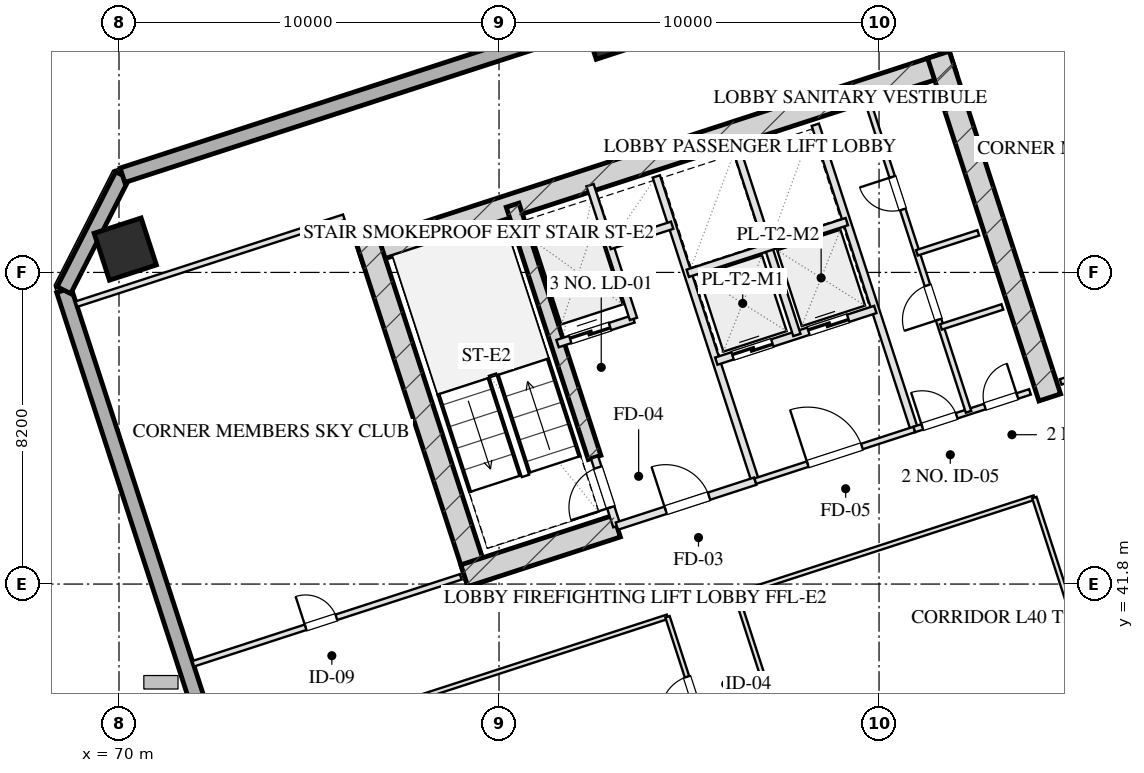
"""IFC4 building model, lengths in metres.
Left out: names, types, materials, properties, quantities, classifications, styles, units other than length and angle.
Written with IfcOpenShell. Run it as: python <this file> out.ifc"""

import sys

from ifc_helpers import new_model, si_unit, direction, frame, frame_2d, origin, origin_2d, place, context, subcontext, project, spatial, rectangle, hollow_rectangle, extrude, element, fill, save


model = new_model("IFC4")
c1 = context("Model", 3, precision=1e-05, world=origin(), true_north=direction((0.0, 1.0)))
c2 = subcontext(c1, "Body", "Model", "MODEL_VIEW")
j1 = project(units=[si_unit("LENGTHUNIT", "METRE"), si_unit("PLANEANGLEUNIT", "RADIAN")], contexts=[c1])
p1 = place(None, origin())
s1 = spatial("IfcSite", under=j1, at=p1, CompositionType="ELEMENT")
p2 = place(p1, origin())
s2 = spatial("IfcBuilding", under=s1, at=p2, CompositionType="ELEMENT")
p3 = place(p2, frame((0.0, 0.0, 152.95)))
s3 = spatial("IfcBuildingStorey", under=s2, at=p3, CompositionType="ELEMENT", Elevation=152.95)
p4 = place(p3, frame((76.344, 50.466, 0.0), z_axis=(0.0, 0.0, 1.0), x_axis=(0.951055727519, 0.309019421968, 0.0)))
e1 = element("IfcWall", 1, at=p4, inside=s3, PredefinedType="SHEAR", context=c2, shape_type="SweptSolid", body=[
    extrude(rectangle(XDim=16.4, YDim=0.6, at=frame_2d((8.2, 0.0))), origin(), (0.0, 0.0, 1.0), 3.45),
])
for number, where, z_axis, x_axis in (
    (2, (79.466, 41.828, 0.0), (0.0, 0.0, 1.0), (-0.309, 0.951, 0.0)),
    (3, (94.492, 46.71, 0.0), (0.0, 0.0, 1.0), (-0.309, 0.951, 0.0)),
):
    element("IfcWall", number, at=place(p3, frame(where, z_axis=z_axis, x_axis=x_axis)), inside=s3, PredefinedType="SHEAR", context=c2, shape_type="SweptSolid", body=[
        extrude(rectangle(XDim=9.48, YDim=0.6, at=frame_2d((4.74, 0.0))), origin(), (0.0, 0.0, 1.0), 3.45),
    ])
p5 = place(p3, frame((82.514, 45.131, 0.0), z_axis=(0.0, 0.0, 1.0), x_axis=(-0.308988790936, 0.951065679686, 0.0)))
e4 = element("IfcWall", 4, at=p5, inside=s3, PredefinedType="SHEAR", context=c2, shape_type="SweptSolid", body=[
    extrude(rectangle(XDim=6.98, YDim=0.35, at=frame_2d((3.49, 0.0))), origin(), (0.0, 0.0, 1.0), 3.45),
])
p6 = place(p3, frame((79.087, 42.021, 0.0), z_axis=(0.0, 0.0, 1.0), x_axis=(0.951062550203, 0.3089984233, 0.0)))
e5 = element("IfcWall", 5, at=p6, inside=s3, PredefinedType="SHEAR", context=c2, shape_type="SweptSolid", body=[
    extrude(rectangle(XDim=4.22, YDim=0.6, at=frame_2d((2.11, 0.0))), origin(), (0.0, 0.0, 1.0), 3.45),
])
p7 = place(p3, frame((70.165, 50.614, 0.0), z_axis=(0.0, 0.0, 1.0), x_axis=(0.951056516295, 0.309016994375, 0.0)))
e6 = element("IfcColumn", 6, at=p7, inside=s3, PredefinedType="COLUMN", context=c2, shape_type="SweptSolid", body=[
    extrude(hollow_rectangle(XDim=1.3, YDim=1.3, WallThickness=0.045, at=origin_2d()), origin(), (0.0, 0.0, 1.0), 3.451),
])
p8 = place(p3, frame((82.815, 56.112, 0.0), z_axis=(0.0, 0.0, 1.0), x_axis=(0.951056516295, 0.309016994375, 0.0)))
e7 = element("IfcColumn", 7, at=p8, inside=s3, PredefinedType="COLUMN", context=c2, shape_type="SweptSolid", body=[
    extrude(hollow_rectangle(XDim=0.8, YDim=0.8, WallThickness=0.028, at=origin_2d()), origin(), (0.0, 0.0, 1.0), 3.451),
])
p9 = place(p3, frame((81.776, 8.827, 0.0), z_axis=(0.0, 0.0, 1.0), x_axis=(-0.309014228706, 0.951057414911, 0.0)))
e8 = element("IfcWall", 8, at=p9, inside=s3, PredefinedType="SOLIDWALL", context=c2, shape_type="SweptSolid", body=[
    extrude(rectangle(XDim=42.8, YDim=0.4, at=frame_2d((21.4, 0.0))), origin(), (0.0, 0.0, 1.0), 2.61),
])
p10 = place(p9, frame((26.675, 0.0, 0.75)))
e9 = element("IfcOpeningElement", 9, at=p10, cuts=e8, PredefinedType="OPENING", context=c2, shape_type="SweptSolid", body=[
    extrude(rectangle(XDim=2.25, YDim=1.46, at=frame_2d((1.125, 0.73))), frame((0.0, 0.21, 0.0), z_axis=(0.0, -1.0, 0.0), x_axis=(1.0, 0.0, 0.0)), (0.0, 0.0, 1.0), 0.42),
])
p11 = place(p9, frame((15.05, 0.0, 0.0)))
e10 = element("IfcOpeningElement", 10, at=p11, cuts=e8, PredefinedType="OPENING", context=c2, shape_type="SweptSolid", body=[
    extrude(rectangle(XDim=1.1, YDim=2.15, at=frame_2d((0.55, 1.075))), frame((0.0, 0.21, 0.0), z_axis=(0.0, -1.0, 0.0), x_axis=(1.0, 0.0, 0.0)), (0.0, 0.0, 1.0), 0.42),
])
p12 = place(p3, frame((68.551, 49.532, 0.0), z_axis=(0.0, 0.0, 1.0), x_axis=(0.454019523198, 0.890991735402, 0.0)))
e11 = element("IfcWall", 11, at=p12, inside=s3, PredefinedType="SOLIDWALL", context=c2, shape_type="SweptSolid", body=[
    extrude(rectangle(XDim=3.394, YDim=0.4, at=frame_2d((1.697, 0.0))), origin(), (0.0, 0.0, 1.0), 2.61),
])
p13 = place(p3, frame((70.092, 52.556, 0.0), z_axis=(0.0, 0.0, 1.0), x_axis=(0.951057580055, 0.30901372044, 0.0)))
e12 = element("IfcWall", 12, at=p13, inside=s3, PredefinedType="SOLIDWALL", context=c2, shape_type="SweptSolid", body=[
    extrude(rectangle(XDim=26.4, YDim=0.4, at=frame_2d((13.2, 0.0))), origin(), (0.0, 0.0, 1.0), 2.61),
])
p14 = place(p3, frame((83.101, 43.324, 0.0), z_axis=(0.0, 0.0, 1.0), x_axis=(-0.309048298632, 0.951046344356, 0.0)))
e13 = element("IfcWall", 13, at=p14, inside=s3, PredefinedType="PARTITIONING", context=c2, shape_type="SweptSolid", body=[
    extrude(rectangle(XDim=1.9, YDim=0.2, at=frame_2d((0.95, 0.0))), origin(), (0.0, 0.0, 1.0), 3.175),
])
p15 = place(p14, frame((0.52, 0.0, 0.0)))
e14 = element("IfcOpeningElement", 14, at=p15, cuts=e13, PredefinedType="OPENING", context=c2, shape_type="SweptSolid", body=[
    extrude(rectangle(XDim=1.1, YDim=2.05, at=frame_2d((0.55, 1.025))), frame((0.0, 0.11, 0.0), z_axis=(0.0, -1.0, 0.0), x_axis=(1.0, 0.0, 0.0)), (0.0, 0.0, 1.0), 0.22),
])
p16 = place(p3, frame((86.743, 44.508, 0.0), z_axis=(0.0, 0.0, 1.0), x_axis=(-0.309016001439, 0.951056838919, 0.0)))
e15 = element("IfcWall", 15, at=p16, inside=s3, PredefinedType="PARTITIONING", context=c2, shape_type="SweptSolid", body=[
    extrude(rectangle(XDim=8.43, YDim=0.2, at=frame_2d((4.215, 0.0))), origin(), (0.0, 0.0, 1.0), 3.175),
])
p17 = place(p3, frame((83.101, 43.324, 0.0), z_axis=(0.0, 0.0, 1.0), x_axis=(0.951052804469, 0.309028417967, 0.0)))
e16 = element("IfcWall", 16, at=p17, inside=s3, PredefinedType="PARTITIONING", context=c2, shape_type="SweptSolid", body=[
    extrude(rectangle(XDim=3.83, YDim=0.2, at=frame_2d((1.915, 0.0))), origin(), (0.0, 0.0, 1.0), 3.175),
])
p18 = place(p17, frame((1.35, 0.0, 0.0)))
e17 = element("IfcOpeningElement", 17, at=p18, cuts=e16, PredefinedType="OPENING", context=c2, shape_type="SweptSolid", body=[
    extrude(rectangle(XDim=1.2, YDim=2.05, at=frame_2d((0.6, 1.025))), frame((0.0, 0.11, 0.0), z_axis=(0.0, -1.0, 0.0), x_axis=(1.0, 0.0, 0.0)), (0.0, 0.0, 1.0), 0.22),
])
p19 = place(p3, frame((81.54, 48.127, 0.0), z_axis=(0.0, 0.0, 1.0), x_axis=(0.951062257173, 0.308999325213, 0.0)))
e18 = element("IfcWall", 18, at=p19, inside=s3, PredefinedType="PARTITIONING", context=c2, shape_type="SweptSolid", body=[
    extrude(rectangle(XDim=2.1, YDim=0.2, at=frame_2d((1.05, 0.0))), origin(), (0.0, 0.0, 1.0), 3.175),
])
p20 = place(p19, frame((0.35, 0.0, 0.0)))
e19 = element("IfcOpeningElement", 19, at=p20, cuts=e18, PredefinedType="OPENING", context=c2, shape_type="SweptSolid", body=[
    extrude(rectangle(XDim=1.1, YDim=2.05, at=frame_2d((0.55, 1.025))), frame((0.0, 0.11, 0.0), z_axis=(0.0, -1.0, 0.0), x_axis=(1.0, 0.0, 0.0)), (0.0, 0.0, 1.0), 0.22),
])
p21 = place(p3, frame((83.538, 48.776, 0.0), z_axis=(0.0, 0.0, 1.0), x_axis=(-0.3089935693, 0.951064127245, 0.0)))
e20 = element("IfcWall", 20, at=p21, inside=s3, PredefinedType="PARTITIONING", context=c2, shape_type="SweptSolid", body=[
    extrude(rectangle(XDim=3.7, YDim=0.2, at=frame_2d((1.85, 0.0))), origin(), (0.0, 0.0, 1.0), 3.175),
])
p22 = place(p3, frame((82.91, 50.707, 0.0), z_axis=(0.0, 0.0, 1.0), x_axis=(0.951041328149, 0.309063734775, 0.0)))
e21 = element("IfcWall", 21, at=p22, inside=s3, PredefinedType="PARTITIONING", context=c2, shape_type="SweptSolid", body=[
    extrude(rectangle(XDim=1.73, YDim=0.2, at=frame_2d((0.865, 0.0))), origin(), (0.0, 0.0, 1.0), 3.175),
])
p23 = place(p3, frame((90.928, 45.868, 0.0), z_axis=(0.0, 0.0, 1.0), x_axis=(-0.309042196757, 0.951048327176, 0.0)))
e22 = element("IfcWall", 22, at=p23, inside=s3, PredefinedType="PARTITIONING", context=c2, shape_type="SweptSolid", body=[
    extrude(rectangle(XDim=8.43, YDim=0.2, at=frame_2d((4.215, 0.0))), origin(), (0.0, 0.0, 1.0), 3.175),
])
p24 = place(p3, frame((86.743, 44.508, 0.0), z_axis=(0.0, 0.0, 1.0), x_axis=(0.951063829732, 0.308994485023, 0.0)))
e23 = element("IfcWall", 23, at=p24, inside=s3, PredefinedType="PARTITIONING", context=c2, shape_type="SweptSolid", body=[
    extrude(rectangle(XDim=4.4, YDim=0.15, at=frame_2d((2.2, 0.0))), origin(), (0.0, 0.0, 1.0), 3.175),
])
p25 = place(p24, frame((1.45, 0.0, 0.0)))
e24 = element("IfcOpeningElement", 24, at=p25, cuts=e23, PredefinedType="OPENING", context=c2, shape_type="SweptSolid", body=[
    extrude(rectangle(XDim=1.5, YDim=2.05, at=frame_2d((0.75, 1.025))), frame((0.0, 0.085, 0.0), z_axis=(0.0, -1.0, 0.0), x_axis=(1.0, 0.0, 0.0)), (0.0, 0.0, 1.0), 0.17),
])
p26 = place(p3, frame((85.718, 47.666, 0.0), z_axis=(0.0, 0.0, 1.0), x_axis=(0.951058531764, 0.30901079133, 0.0)))
e25 = element("IfcWall", 25, at=p26, inside=s3, PredefinedType="PARTITIONING", context=c2, shape_type="SweptSolid", body=[
    extrude(rectangle(XDim=4.4, YDim=0.2, at=frame_2d((2.2, 0.0))), origin(), (0.0, 0.0, 1.0), 3.175),
])
p27 = place(p26, frame((0.45, 0.0, 0.0)))
e26 = element("IfcOpeningElement", 26, at=p27, cuts=e25, PredefinedType="OPENING", context=c2, shape_type="SweptSolid", body=[
    extrude(rectangle(XDim=1.1, YDim=2.05, at=frame_2d((0.55, 1.025))), frame((0.0, 0.11, 0.0), z_axis=(0.0, -1.0, 0.0), x_axis=(1.0, 0.0, 0.0)), (0.0, 0.0, 1.0), 0.22),
])
p28 = place(p26, frame((2.55, 0.0, 0.0)))
e27 = element("IfcOpeningElement", 27, at=p28, cuts=e25, PredefinedType="OPENING", context=c2, shape_type="SweptSolid", body=[
    extrude(rectangle(XDim=1.1, YDim=2.05, at=frame_2d((0.55, 1.025))), frame((0.0, 0.11, 0.0), z_axis=(0.0, -1.0, 0.0), x_axis=(1.0, 0.0, 0.0)), (0.0, 0.0, 1.0), 0.22),
])
p29 = place(p3, frame((87.838, 48.354, 0.0), z_axis=(0.0, 0.0, 1.0), x_axis=(-0.3090093719, 0.951058992953, 0.0)))
e28 = element("IfcWall", 28, at=p29, inside=s3, PredefinedType="PARTITIONING", context=c2, shape_type="SweptSolid", body=[
    extrude(rectangle(XDim=5.11, YDim=0.2, at=frame_2d((2.555, 0.0))), origin(), (0.0, 0.0, 1.0), 3.175),
])
p30 = place(p3, frame((84.967, 49.977, 0.0), z_axis=(0.0, 0.0, 1.0), x_axis=(0.951063829732, 0.308994485023, 0.0)))
e29 = element("IfcWall", 29, at=p30, inside=s3, PredefinedType="PARTITIONING", context=c2, shape_type="SweptSolid", body=[
    extrude(rectangle(XDim=4.4, YDim=0.2, at=frame_2d((2.2, 0.0))), origin(), (0.0, 0.0, 1.0), 3.175),
])
p31 = place(p3, frame((90.928, 45.868, 0.0), z_axis=(0.0, 0.0, 1.0), x_axis=(0.951059297078, 0.309008435874, 0.0)))
e30 = element("IfcWall", 30, at=p31, inside=s3, PredefinedType="PARTITIONING", context=c2, shape_type="SweptSolid", body=[
    extrude(rectangle(XDim=3.2, YDim=0.15, at=frame_2d((1.6, 0.0))), origin(), (0.0, 0.0, 1.0), 3.175),
])
p32 = place(p31, frame((0.22, 0.0, 0.0)))
e31 = element("IfcOpeningElement", 31, at=p32, cuts=e30, PredefinedType="OPENING", context=c2, shape_type="SweptSolid", body=[
    extrude(rectangle(XDim=0.95, YDim=2.05, at=frame_2d((0.475, 1.025))), frame((0.0, 0.085, 0.0), z_axis=(0.0, -1.0, 0.0), x_axis=(1.0, 0.0, 0.0)), (0.0, 0.0, 1.0), 0.17),
])
p33 = place(p31, frame((1.95, 0.0, 0.0)))
e32 = element("IfcOpeningElement", 32, at=p33, cuts=e30, PredefinedType="OPENING", context=c2, shape_type="SweptSolid", body=[
    extrude(rectangle(XDim=0.9, YDim=2.05, at=frame_2d((0.45, 1.025))), frame((0.0, 0.085, 0.0), z_axis=(0.0, -1.0, 0.0), x_axis=(1.0, 0.0, 0.0)), (0.0, 0.0, 1.0), 0.17),
])
p34 = place(p3, frame((92.355, 46.331, 0.0), z_axis=(0.0, 0.0, 1.0), x_axis=(-0.309007490203, 0.951059604335, 0.0)))
e33 = element("IfcWall", 33, at=p34, inside=s3, PredefinedType="PARTITIONING", context=c2, shape_type="SweptSolid", body=[
    extrude(rectangle(XDim=8.43, YDim=0.15, at=frame_2d((4.215, 0.0))), origin(), (0.0, 0.0, 1.0), 3.175),
])
p35 = place(p34, frame((2.55, 0.0, 0.0)))
e34 = element("IfcOpeningElement", 34, at=p35, cuts=e33, PredefinedType="OPENING", context=c2, shape_type="SweptSolid", body=[
    extrude(rectangle(XDim=0.95, YDim=2.05, at=frame_2d((0.475, 1.025))), frame((0.0, 0.085, 0.0), z_axis=(0.0, -1.0, 0.0), x_axis=(1.0, 0.0, 0.0)), (0.0, 0.0, 1.0), 0.17),
])
p36 = place(p34, frame((5.6, 0.0, 0.0)))
e35 = element("IfcOpeningElement", 35, at=p36, cuts=e33, PredefinedType="OPENING", context=c2, shape_type="SweptSolid", body=[
    extrude(rectangle(XDim=0.9, YDim=2.05, at=frame_2d((0.45, 1.025))), frame((0.0, 0.085, 0.0), z_axis=(0.0, -1.0, 0.0), x_axis=(1.0, 0.0, 0.0)), (0.0, 0.0, 1.0), 0.17),
])
p37 = place(p3, frame((90.995, 50.516, 0.0), z_axis=(0.0, 0.0, 1.0), x_axis=(0.951040401051, 0.309066587596, 0.0)))
e36 = element("IfcWall", 36, at=p37, inside=s3, PredefinedType="PARTITIONING", context=c2, shape_type="SweptSolid", body=[
    extrude(rectangle(XDim=1.7, YDim=0.15, at=frame_2d((0.85, 0.0))), origin(), (0.0, 0.0, 1.0), 3.175),
])
p38 = place(p3, frame((91.628, 48.566, 0.0), z_axis=(0.0, 0.0, 1.0), x_axis=(0.951054116971, 0.309024378638, 0.0)))
e37 = element("IfcWall", 37, at=p38, inside=s3, PredefinedType="PARTITIONING", context=c2, shape_type="SweptSolid", body=[
    extrude(rectangle(XDim=1.7, YDim=0.15, at=frame_2d((0.85, 0.0))), origin(), (0.0, 0.0, 1.0), 3.175),
])
p39 = place(p3, frame((68.88, 49.166, 0.0), z_axis=(0.0, 0.0, 1.0), x_axis=(0.951060977215, 0.309003264738, 0.0)))
e38 = element("IfcWall", 38, at=p39, inside=s3, PredefinedType="PARTITIONING", context=c2, shape_type="SweptSolid", body=[
    extrude(rectangle(XDim=7.4, YDim=0.15, at=frame_2d((3.7, 0.0))), origin(), (0.0, 0.0, 1.0), 3.175),
])
p40 = place(p3, frame((71.955, 39.703, 0.0), z_axis=(0.0, 0.0, 1.0), x_axis=(0.951060977215, 0.309003264738, 0.0)))
e39 = element("IfcWall", 39, at=p40, inside=s3, PredefinedType="PARTITIONING", context=c2, shape_type="SweptSolid", body=[
    extrude(rectangle(XDim=7.4, YDim=0.15, at=frame_2d((3.7, 0.0))), origin(), (0.0, 0.0, 1.0), 3.175),
])
p41 = place(p40, frame((3.108, 0.0, 0.0)))
e40 = element("IfcOpeningElement", 40, at=p41, cuts=e39, PredefinedType="OPENING", context=c2, shape_type="SweptSolid", body=[
    extrude(rectangle(XDim=0.85, YDim=2.05, at=frame_2d((0.425, 1.025))), frame((0.0, 0.085, 0.0), z_axis=(0.0, -1.0, 0.0), x_axis=(1.0, 0.0, 0.0)), (0.0, 0.0, 1.0), 0.17),
])
p42 = place(p3, frame((94.78, 47.119, 0.0), z_axis=(0.0, 0.0, 1.0), x_axis=(0.951057811516, 0.309013008068, 0.0)))
e41 = element("IfcWall", 41, at=p42, inside=s3, PredefinedType="PARTITIONING", context=c2, shape_type="SweptSolid", body=[
    extrude(rectangle(XDim=6.8, YDim=0.15, at=frame_2d((3.4, 0.0))), origin(), (0.0, 0.0, 1.0), 3.175),
])
p43 = place(p42, frame((2.856, 0.0, 0.0)))
e42 = element("IfcOpeningElement", 42, at=p43, cuts=e41, PredefinedType="OPENING", context=c2, shape_type="SweptSolid", body=[
    extrude(rectangle(XDim=1.0, YDim=2.05, at=frame_2d((0.5, 1.025))), frame((0.0, 0.085, 0.0), z_axis=(0.0, -1.0, 0.0), x_axis=(1.0, 0.0, 0.0)), (0.0, 0.0, 1.0), 0.17),
])
p44 = place(p3, frame((72.783, 37.154, 0.0), z_axis=(0.0, 0.0, 1.0), x_axis=(0.9510516424, 0.30903199428, 0.0)))
e43 = element("IfcWall", 43, at=p44, inside=s3, PredefinedType="PARTITIONING", context=c2, shape_type="SweptSolid", body=[
    extrude(rectangle(XDim=12.25, YDim=0.12, at=frame_2d((6.125, 0.0))), origin(), (0.0, 0.0, 1.0), 3.175),
])
p45 = place(p3, frame((86.24, 41.527, 0.0), z_axis=(0.0, 0.0, 1.0), x_axis=(0.951058857521, 0.309009788731, 0.0)))
e44 = element("IfcWall", 44, at=p45, inside=s3, PredefinedType="PARTITIONING", context=c2, shape_type="SweptSolid", body=[
    extrude(rectangle(XDim=8.25, YDim=0.12, at=frame_2d((4.125, 0.0))), origin(), (0.0, 0.0, 1.0), 3.175),
])
p46 = place(p3, frame((89.575, 25.114, 0.0), z_axis=(0.0, 0.0, 1.0), x_axis=(-0.30901773025, 0.951056277195, 0.0)))
e45 = element("IfcWall", 45, at=p46, inside=s3, PredefinedType="PARTITIONING", context=c2, shape_type="SweptSolid", body=[
    extrude(rectangle(XDim=16.64, YDim=0.12, at=frame_2d((8.32, 0.0))), origin(), (0.0, 0.0, 1.0), 3.175),
])
p47 = place(p46, frame((1.66, 0.0, 0.0)))
e46 = element("IfcOpeningElement", 46, at=p47, cuts=e45, PredefinedType="OPENING", context=c2, shape_type="SweptSolid", body=[
    extrude(rectangle(XDim=1.0, YDim=2.05, at=frame_2d((0.5, 1.025))), frame((0.0, 0.07, 0.0), z_axis=(0.0, -1.0, 0.0), x_axis=(1.0, 0.0, 0.0)), (0.0, 0.0, 1.0), 0.14),
])
p48 = place(p46, frame((7.82, 0.0, 0.0)))
e47 = element("IfcOpeningElement", 47, at=p48, cuts=e45, PredefinedType="OPENING", context=c2, shape_type="SweptSolid", body=[
    extrude(rectangle(XDim=1.05, YDim=2.05, at=frame_2d((0.525, 1.025))), frame((0.0, 0.07, 0.0), z_axis=(0.0, -1.0, 0.0), x_axis=(1.0, 0.0, 0.0)), (0.0, 0.0, 1.0), 0.14),
])
p49 = place(p46, frame((13.98, 0.0, 0.0)))
e48 = element("IfcOpeningElement", 48, at=p49, cuts=e45, PredefinedType="OPENING", context=c2, shape_type="SweptSolid", body=[
    extrude(rectangle(XDim=1.0, YDim=2.05, at=frame_2d((0.5, 1.025))), frame((0.0, 0.07, 0.0), z_axis=(0.0, -1.0, 0.0), x_axis=(1.0, 0.0, 0.0)), (0.0, 0.0, 1.0), 0.14),
])
p50 = place(p3, frame((91.382, 25.701, 0.0), z_axis=(0.0, 0.0, 1.0), x_axis=(-0.309004459387, 0.951060589068, 0.0)))
e49 = element("IfcWall", 49, at=p50, inside=s3, PredefinedType="PARTITIONING", context=c2, shape_type="SweptSolid", body=[
    extrude(rectangle(XDim=16.64, YDim=0.12, at=frame_2d((8.32, 0.0))), origin(), (0.0, 0.0, 1.0), 3.175),
])
p51 = place(p50, frame((7.987, 0.0, 0.0)))
e50 = element("IfcOpeningElement", 50, at=p51, cuts=e49, PredefinedType="OPENING", context=c2, shape_type="SweptSolid", body=[
    extrude(rectangle(XDim=1.1, YDim=2.05, at=frame_2d((0.55, 1.025))), frame((0.0, 0.07, 0.0), z_axis=(0.0, -1.0, 0.0), x_axis=(1.0, 0.0, 0.0)), (0.0, 0.0, 1.0), 0.14),
])
p52 = place(p3, frame((99.229, 28.25, 0.0), z_axis=(0.0, 0.0, 1.0), x_axis=(-0.30901773025, 0.951056277195, 0.0)))
e51 = element("IfcWall", 51, at=p52, inside=s3, PredefinedType="PARTITIONING", context=c2, shape_type="SweptSolid", body=[
    extrude(rectangle(XDim=16.64, YDim=0.12, at=frame_2d((8.32, 0.0))), origin(), (0.0, 0.0, 1.0), 3.175),
])
p53 = place(p15, origin())
e52 = element("IfcDoor", 52, at=p53, inside=s3, OperationType="SINGLE_SWING_LEFT", PredefinedType="DOOR", context=c2, shape_type="SweptSolid", body=[
    extrude(rectangle(XDim=1.1, YDim=2.05, at=frame_2d((0.55, 1.025))), frame((0.0, 0.025, 0.0), z_axis=(0.0, -1.0, 0.0), x_axis=(1.0, 0.0, 0.0)), (0.0, 0.0, 1.0), 0.05),
])
fill(e14, e52)
p54 = place(p18, origin())
e53 = element("IfcDoor", 53, at=p54, inside=s3, OperationType="SINGLE_SWING_LEFT", PredefinedType="DOOR", context=c2, shape_type="SweptSolid", body=[
    extrude(rectangle(XDim=1.2, YDim=2.05, at=frame_2d((0.6, 1.025))), frame((0.0, 0.025, 0.0), z_axis=(0.0, -1.0, 0.0), x_axis=(1.0, 0.0, 0.0)), (0.0, 0.0, 1.0), 0.05),
])
fill(e17, e53)
p55 = place(p20, origin())
e54 = element("IfcDoor", 54, at=p55, inside=s3, OperationType="DOUBLE_DOOR_SLIDING", PredefinedType="DOOR", context=c2, shape_type="SweptSolid", body=[
    extrude(rectangle(XDim=1.1, YDim=2.05, at=frame_2d((0.55, 1.025))), frame((0.0, 0.025, 0.0), z_axis=(0.0, -1.0, 0.0), x_axis=(1.0, 0.0, 0.0)), (0.0, 0.0, 1.0), 0.05),
])
fill(e19, e54)
p56 = place(p25, origin())
e55 = element("IfcDoor", 55, at=p56, inside=s3, OperationType="SINGLE_SWING_LEFT", PredefinedType="DOOR", context=c2, shape_type="SweptSolid", body=[
    extrude(rectangle(XDim=1.5, YDim=2.05, at=frame_2d((0.75, 1.025))), frame((0.0, 0.025, 0.0), z_axis=(0.0, -1.0, 0.0), x_axis=(1.0, 0.0, 0.0)), (0.0, 0.0, 1.0), 0.05),
])
fill(e24, e55)
p57 = place(p27, origin())
e56 = element("IfcDoor", 56, at=p57, inside=s3, OperationType="DOUBLE_DOOR_SLIDING", PredefinedType="DOOR", context=c2, shape_type="SweptSolid", body=[
    extrude(rectangle(XDim=1.1, YDim=2.05, at=frame_2d((0.55, 1.025))), frame((0.0, 0.025, 0.0), z_axis=(0.0, -1.0, 0.0), x_axis=(1.0, 0.0, 0.0)), (0.0, 0.0, 1.0), 0.05),
])
fill(e26, e56)
p58 = place(p28, origin())
e57 = element("IfcDoor", 57, at=p58, inside=s3, OperationType="DOUBLE_DOOR_SLIDING", PredefinedType="DOOR", context=c2, shape_type="SweptSolid", body=[
    extrude(rectangle(XDim=1.1, YDim=2.05, at=frame_2d((0.55, 1.025))), frame((0.0, 0.025, 0.0), z_axis=(0.0, -1.0, 0.0), x_axis=(1.0, 0.0, 0.0)), (0.0, 0.0, 1.0), 0.05),
])
fill(e27, e57)
p59 = place(p32, origin())
e58 = element("IfcDoor", 58, at=p59, inside=s3, OperationType="SINGLE_SWING_LEFT", PredefinedType="DOOR", context=c2, shape_type="SweptSolid", body=[
    extrude(rectangle(XDim=0.95, YDim=2.05, at=frame_2d((0.475, 1.025))), frame((0.0, 0.025, 0.0), z_axis=(0.0, -1.0, 0.0), x_axis=(1.0, 0.0, 0.0)), (0.0, 0.0, 1.0), 0.05),
])
fill(e31, e58)
p60 = place(p33, origin())
e59 = element("IfcDoor", 59, at=p60, inside=s3, OperationType="SINGLE_SWING_RIGHT", PredefinedType="DOOR", context=c2, shape_type="SweptSolid", body=[
    extrude(rectangle(XDim=0.9, YDim=2.05, at=frame_2d((0.45, 1.025))), frame((0.0, 0.025, 0.0), z_axis=(0.0, -1.0, 0.0), x_axis=(1.0, 0.0, 0.0)), (0.0, 0.0, 1.0), 0.05),
])
fill(e32, e59)
p61 = place(p35, origin())
e60 = element("IfcDoor", 60, at=p61, inside=s3, OperationType="SINGLE_SWING_LEFT", PredefinedType="DOOR", context=c2, shape_type="SweptSolid", body=[
    extrude(rectangle(XDim=0.95, YDim=2.05, at=frame_2d((0.475, 1.025))), frame((0.0, 0.025, 0.0), z_axis=(0.0, -1.0, 0.0), x_axis=(1.0, 0.0, 0.0)), (0.0, 0.0, 1.0), 0.05),
])
fill(e34, e60)
p62 = place(p36, origin())
e61 = element("IfcDoor", 61, at=p62, inside=s3, OperationType="SINGLE_SWING_RIGHT", PredefinedType="DOOR", context=c2, shape_type="SweptSolid", body=[
    extrude(rectangle(XDim=0.9, YDim=2.05, at=frame_2d((0.45, 1.025))), frame((0.0, 0.025, 0.0), z_axis=(0.0, -1.0, 0.0), x_axis=(1.0, 0.0, 0.0)), (0.0, 0.0, 1.0), 0.05),
])
fill(e35, e61)
p63 = place(p41, origin())
e62 = element("IfcDoor", 62, at=p63, inside=s3, OperationType="SINGLE_SWING_LEFT", PredefinedType="DOOR", context=c2, shape_type="SweptSolid", body=[
    extrude(rectangle(XDim=0.85, YDim=2.05, at=frame_2d((0.425, 1.025))), frame((0.0, 0.025, 0.0), z_axis=(0.0, -1.0, 0.0), x_axis=(1.0, 0.0, 0.0)), (0.0, 0.0, 1.0), 0.05),
])
fill(e40, e62)
p64 = place(p49, origin())
e63 = element("IfcDoor", 63, at=p64, inside=s3, OperationType="SINGLE_SWING_LEFT", PredefinedType="DOOR", context=c2, shape_type="SweptSolid", body=[
    extrude(rectangle(XDim=1.0, YDim=2.05, at=frame_2d((0.5, 1.025))), frame((0.0, 0.025, 0.0), z_axis=(0.0, -1.0, 0.0), x_axis=(1.0, 0.0, 0.0)), (0.0, 0.0, 1.0), 0.05),
])
fill(e48, e63)
save(model, sys.argv[1])
